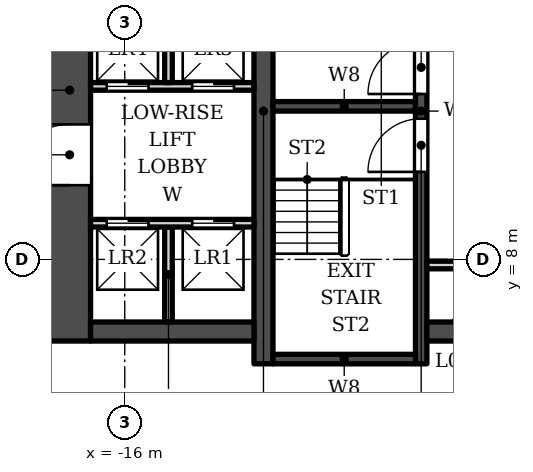
"""IFC4 building model, lengths in metres.
Left out: names, types, materials, properties, quantities, classifications, styles, units other than length and angle.
Written with IfcOpenShell. Run it as: python <this file> out.ifc"""

import sys

from ifc_helpers import new_model, si_unit, direction, frame, frame_2d, origin, place, context, subcontext, project, spatial, rectangle, extrude, element, fill, save


model = new_model("IFC4")
c1 = context("Model", 3, precision=1e-05, world=origin(), true_north=direction((0.0, 1.0)))
c2 = subcontext(c1, "Body", "Model", "MODEL_VIEW")
j1 = project(units=[si_unit("LENGTHUNIT", "METRE"), si_unit("PLANEANGLEUNIT", "RADIAN")], contexts=[c1])
p1 = place(None, origin())
s1 = spatial("IfcSite", under=j1, at=p1, CompositionType="ELEMENT")
p2 = place(p1, origin())
s2 = spatial("IfcBuilding", under=s1, at=p2, CompositionType="ELEMENT")
p3 = place(p2, frame((0.0, 0.0, 34.5)))
s3 = spatial("IfcBuildingStorey", under=s2, at=p3, CompositionType="ELEMENT", Elevation=34.5)
p4 = place(p3, frame((-12.35, 5.253, 0.0), z_axis=(0.0, 0.0, 1.0), x_axis=(0.0, 1.0, 0.0)))
e1 = element("IfcWall", 1, at=p4, inside=s3, PredefinedType="SHEAR", context=c2, shape_type="SweptSolid", body=[
    extrude(rectangle(XDim=13.3, YDim=0.5, at=frame_2d((6.65, 0.0))), origin(), (0.0, 0.0, 1.0), 5.5),
])
p5 = place(p3, frame((-8.2, 5.253, 0.0), z_axis=(0.0, 0.0, 1.0), x_axis=(0.0, 1.0, 0.0)))
e2 = element("IfcWall", 2, at=p5, inside=s3, PredefinedType="SHEAR", context=c2, shape_type="SweptSolid", body=[
    extrude(rectangle(XDim=13.3, YDim=0.3, at=frame_2d((6.65, 0.0))), origin(), (0.0, 0.0, 1.0), 5.5),
])
p6 = place(p5, frame((7.1, 0.0, 0.0)))
e3 = element("IfcOpeningElement", 3, at=p6, cuts=e2, PredefinedType="OPENING", context=c2, shape_type="SweptSolid", body=[
    extrude(rectangle(XDim=1.4, YDim=2.1, at=frame_2d((0.7, 1.05))), frame((0.0, 0.16, 0.0), z_axis=(0.0, -1.0, 0.0), x_axis=(1.0, 0.0, 0.0)), (0.0, 0.0, 1.0), 0.32),
])
p7 = place(p5, frame((5.05, 0.0, 0.0)))
e4 = element("IfcOpeningElement", 4, at=p7, cuts=e2, PredefinedType="OPENING", context=c2, shape_type="SweptSolid", body=[
    extrude(rectangle(XDim=1.4, YDim=2.1, at=frame_2d((0.7, 1.05))), frame((0.0, 0.16, 0.0), z_axis=(0.0, -1.0, 0.0), x_axis=(1.0, 0.0, 0.0)), (0.0, 0.0, 1.0), 0.32),
])
for number, where, z_axis, x_axis in (
    (5, (-12.1, 12.028, 0.0), (0.0, 0.0, 1.0), (1.0, 0.0, 0.0)),
    (6, (-12.1, 5.378, 0.0), (0.0, 0.0, 1.0), (1.0, 0.0, 0.0)),
):
    element("IfcWall", number, at=place(p3, frame(where, z_axis=z_axis, x_axis=x_axis)), inside=s3, PredefinedType="SHEAR", context=c2, shape_type="SweptSolid", body=[
        extrude(rectangle(XDim=3.75, YDim=0.25, at=frame_2d((1.875, 0.0))), origin(), (0.0, 0.0, 1.0), 5.5),
    ])
p8 = place(p3, frame((-8.05, 6.103, 0.0), z_axis=(0.0, 0.0, 1.0), x_axis=(1.0, 0.0, 0.0)))
e7 = element("IfcWall", 7, at=p8, inside=s3, PredefinedType="SHEAR", context=c2, shape_type="SweptSolid", body=[
    extrude(rectangle(XDim=7.05, YDim=0.5, at=frame_2d((3.525, 0.0))), origin(), (0.0, 0.0, 1.0), 5.5),
])
p9 = place(p8, frame((0.825, 0.0, 0.0)))
e8 = element("IfcOpeningElement", 8, at=p9, cuts=e7, PredefinedType="OPENING", context=c2, shape_type="SweptSolid", body=[
    extrude(rectangle(XDim=0.9, YDim=2.1, at=frame_2d((0.45, 1.05))), frame((0.0, 0.26, 0.0), z_axis=(0.0, -1.0, 0.0), x_axis=(1.0, 0.0, 0.0)), (0.0, 0.0, 1.0), 0.52),
])
p10 = place(p3, frame((-12.6, 6.103, 0.0), z_axis=(0.0, 0.0, 1.0), x_axis=(-1.0, 0.0, 0.0)))
e9 = element("IfcWall", 9, at=p10, inside=s3, PredefinedType="SHEAR", context=c2, shape_type="SweptSolid", body=[
    extrude(rectangle(XDim=4.3, YDim=0.5, at=frame_2d((2.15, 0.0))), origin(), (0.0, 0.0, 1.0), 5.5),
])
p11 = place(p3, frame((-17.45, 5.853, 0.0), z_axis=(0.0, 0.0, 1.0), x_axis=(0.0, 1.0, 0.0)))
e10 = element("IfcWall", 10, at=p11, inside=s3, PredefinedType="SHEAR", context=c2, shape_type="SweptSolid", body=[
    extrude(rectangle(XDim=13.2, YDim=1.1, at=frame_2d((6.6, 0.0))), origin(), (0.0, 0.0, 1.0), 5.5),
])
p12 = place(p11, frame((4.1, 0.0, 0.0)))
e11 = element("IfcOpeningElement", 11, at=p12, cuts=e10, PredefinedType="OPENING", context=c2, shape_type="SweptSolid", body=[
    extrude(rectangle(XDim=1.6, YDim=2.1, at=frame_2d((0.8, 1.05))), frame((0.0, 0.56, 0.0), z_axis=(0.0, -1.0, 0.0), x_axis=(1.0, 0.0, 0.0)), (0.0, 0.0, 1.0), 1.12),
])
p13 = place(p11, frame((9.75, 0.0, 0.0)))
e12 = element("IfcOpeningElement", 12, at=p13, cuts=e10, PredefinedType="OPENING", context=c2, shape_type="SweptSolid", body=[
    extrude(rectangle(XDim=0.9, YDim=2.1, at=frame_2d((0.45, 1.05))), frame((0.0, 0.56, 0.0), z_axis=(0.0, -1.0, 0.0), x_axis=(1.0, 0.0, 0.0)), (0.0, 0.0, 1.0), 1.12),
])
for number, where, z_axis, x_axis in (
    (13, (-14.85, 6.353, 0.0), (0.0, 0.0, 1.0), (0.0, 1.0, 0.0)),
    (14, (-8.05, 7.853, 0.0), (0.0, 0.0, 1.0), (1.0, 0.0, 0.0)),
):
    element("IfcWall", number, at=place(p3, frame(where, z_axis=z_axis, x_axis=x_axis)), inside=s3, PredefinedType="SOLIDWALL", context=c2, shape_type="SweptSolid", body=[
        extrude(rectangle(XDim=2.5, YDim=0.2, at=frame_2d((1.25, 0.0))), origin(), (0.0, 0.0, 1.0), 5.05),
    ])
p14 = place(p3, frame((-16.9, 8.953, 0.0), z_axis=(0.0, 0.0, 1.0), x_axis=(1.0, 0.0, 0.0)))
e15 = element("IfcWall", 15, at=p14, inside=s3, PredefinedType="SOLIDWALL", context=c2, shape_type="SweptSolid", body=[
    extrude(rectangle(XDim=4.3, YDim=0.2, at=frame_2d((2.15, 0.0))), origin(), (0.0, 0.0, 1.0), 5.05),
])
p15 = place(p14, frame((2.675, 0.0, 0.0)))
e16 = element("IfcOpeningElement", 16, at=p15, cuts=e15, PredefinedType="OPENING", context=c2, shape_type="SweptSolid", body=[
    extrude(rectangle(XDim=1.1, YDim=2.1, at=frame_2d((0.55, 1.05))), frame((0.0, 0.11, 0.0), z_axis=(0.0, -1.0, 0.0), x_axis=(1.0, 0.0, 0.0)), (0.0, 0.0, 1.0), 0.22),
])
p16 = place(p14, frame((0.425, 0.0, 0.0)))
e17 = element("IfcOpeningElement", 17, at=p16, cuts=e15, PredefinedType="OPENING", context=c2, shape_type="SweptSolid", body=[
    extrude(rectangle(XDim=1.1, YDim=2.1, at=frame_2d((0.55, 1.05))), frame((0.0, 0.11, 0.0), z_axis=(0.0, -1.0, 0.0), x_axis=(1.0, 0.0, 0.0)), (0.0, 0.0, 1.0), 0.22),
])
p17 = place(p3, frame((-16.9, 12.552, 0.0), z_axis=(0.0, 0.0, 1.0), x_axis=(1.0, 0.0, 0.0)))
e18 = element("IfcWall", 18, at=p17, inside=s3, PredefinedType="SOLIDWALL", context=c2, shape_type="SweptSolid", body=[
    extrude(rectangle(XDim=4.3, YDim=0.2, at=frame_2d((2.15, 0.0))), origin(), (0.0, 0.0, 1.0), 5.05),
])
p18 = place(p17, frame((2.675, 0.0, 0.0)))
e19 = element("IfcOpeningElement", 19, at=p18, cuts=e18, PredefinedType="OPENING", context=c2, shape_type="SweptSolid", body=[
    extrude(rectangle(XDim=1.1, YDim=2.1, at=frame_2d((0.55, 1.05))), frame((0.0, 0.11, 0.0), z_axis=(0.0, -1.0, 0.0), x_axis=(1.0, 0.0, 0.0)), (0.0, 0.0, 1.0), 0.22),
])
p19 = place(p17, frame((0.425, 0.0, 0.0)))
e20 = element("IfcOpeningElement", 20, at=p19, cuts=e18, PredefinedType="OPENING", context=c2, shape_type="SweptSolid", body=[
    extrude(rectangle(XDim=1.1, YDim=2.1, at=frame_2d((0.55, 1.05))), frame((0.0, 0.11, 0.0), z_axis=(0.0, -1.0, 0.0), x_axis=(1.0, 0.0, 0.0)), (0.0, 0.0, 1.0), 0.22),
])
p20 = place(p3, frame((-14.85, 12.653, 0.0), z_axis=(0.0, 0.0, 1.0), x_axis=(0.0, 1.0, 0.0)))
e21 = element("IfcWall", 21, at=p20, inside=s3, PredefinedType="SOLIDWALL", context=c2, shape_type="SweptSolid", body=[
    extrude(rectangle(XDim=2.6, YDim=0.2, at=frame_2d((1.3, 0.0))), origin(), (0.0, 0.0, 1.0), 5.05),
])
p21 = place(p15, origin())
e22 = element("IfcDoor", 22, at=p21, inside=s3, OperationType="DOUBLE_DOOR_SLIDING", PredefinedType="DOOR", context=c2, shape_type="SweptSolid", body=[
    extrude(rectangle(XDim=1.1, YDim=2.1, at=frame_2d((0.55, 1.05))), frame((0.0, 0.025, 0.0), z_axis=(0.0, -1.0, 0.0), x_axis=(1.0, 0.0, 0.0)), (0.0, 0.0, 1.0), 0.05),
])
fill(e16, e22)
p22 = place(p18, origin())
e23 = element("IfcDoor", 23, at=p22, inside=s3, OperationType="DOUBLE_DOOR_SLIDING", PredefinedType="DOOR", context=c2, shape_type="SweptSolid", body=[
    extrude(rectangle(XDim=1.1, YDim=2.1, at=frame_2d((0.55, 1.05))), frame((0.0, 0.025, 0.0), z_axis=(0.0, -1.0, 0.0), x_axis=(1.0, 0.0, 0.0)), (0.0, 0.0, 1.0), 0.05),
])
fill(e19, e23)
p23 = place(p16, origin())
e24 = element("IfcDoor", 24, at=p23, inside=s3, OperationType="DOUBLE_DOOR_SLIDING", PredefinedType="DOOR", context=c2, shape_type="SweptSolid", body=[
    extrude(rectangle(XDim=1.1, YDim=2.1, at=frame_2d((0.55, 1.05))), frame((0.0, 0.025, 0.0), z_axis=(0.0, -1.0, 0.0), x_axis=(1.0, 0.0, 0.0)), (0.0, 0.0, 1.0), 0.05),
])
fill(e17, e24)
p24 = place(p19, origin())
e25 = element("IfcDoor", 25, at=p24, inside=s3, OperationType="DOUBLE_DOOR_SLIDING", PredefinedType="DOOR", context=c2, shape_type="SweptSolid", body=[
    extrude(rectangle(XDim=1.1, YDim=2.1, at=frame_2d((0.55, 1.05))), frame((0.0, 0.025, 0.0), z_axis=(0.0, -1.0, 0.0), x_axis=(1.0, 0.0, 0.0)), (0.0, 0.0, 1.0), 0.05),
])
fill(e20, e25)
p25 = place(p6, origin())
e26 = element("IfcDoor", 26, at=p25, inside=s3, OperationType="SINGLE_SWING_LEFT", PredefinedType="DOOR", context=c2, shape_type="SweptSolid", body=[
    extrude(rectangle(XDim=1.4, YDim=2.1, at=frame_2d((0.7, 1.05))), frame((0.0, 0.025, 0.0), z_axis=(0.0, -1.0, 0.0), x_axis=(1.0, 0.0, 0.0)), (0.0, 0.0, 1.0), 0.05),
])
fill(e3, e26)
p26 = place(p7, origin())
e27 = element("IfcDoor", 27, at=p26, inside=s3, OperationType="SINGLE_SWING_LEFT", PredefinedType="DOOR", context=c2, shape_type="SweptSolid", body=[
    extrude(rectangle(XDim=1.4, YDim=2.1, at=frame_2d((0.7, 1.05))), frame((0.0, 0.025, 0.0), z_axis=(0.0, -1.0, 0.0), x_axis=(1.0, 0.0, 0.0)), (0.0, 0.0, 1.0), 0.05),
])
fill(e4, e27)
p27 = place(p12, origin())
e28 = element("IfcDoor", 28, at=p27, inside=s3, OperationType="DOUBLE_DOOR_SINGLE_SWING", PredefinedType="DOOR", context=c2, shape_type="SweptSolid", body=[
    extrude(rectangle(XDim=1.6, YDim=2.1, at=frame_2d((0.8, 1.05))), frame((0.0, -0.225, 0.0), z_axis=(0.0, -1.0, 0.0), x_axis=(1.0, 0.0, 0.0)), (0.0, 0.0, 1.0), 0.05),
])
fill(e11, e28)
save(model, sys.argv[1])
